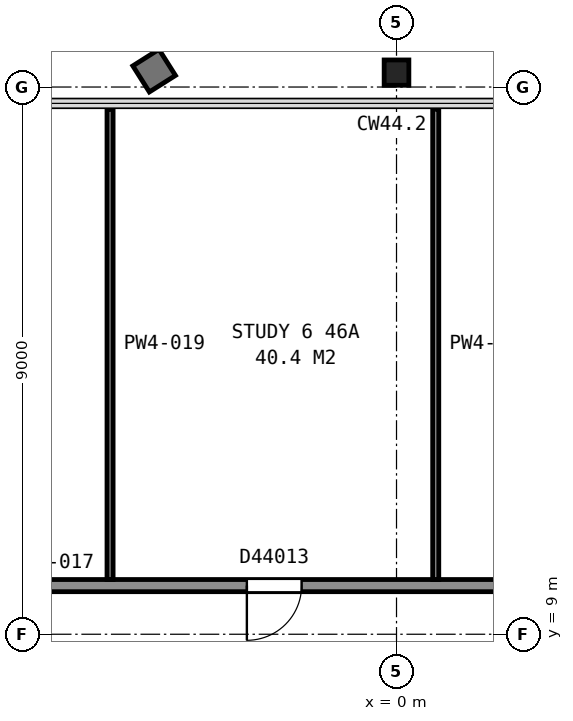
"""IFC4 building model, lengths in metres.
Left out: names, types, materials, properties, quantities, classifications, styles, units other than length and angle.
Written with IfcOpenShell. Run it as: python <this file> out.ifc"""

import sys

from ifc_helpers import new_model, si_unit, direction, frame, frame_2d, origin, origin_2d, place, context, subcontext, project, spatial, rectangle, i_section, extrude, element, fill, save


model = new_model("IFC4")
c1 = context("Model", 3, precision=1e-05, world=origin(), true_north=direction((0.0, 1.0)))
c2 = subcontext(c1, "Body", "Model", "MODEL_VIEW")
j1 = project(units=[si_unit("LENGTHUNIT", "METRE"), si_unit("PLANEANGLEUNIT", "RADIAN")], contexts=[c1])
p1 = place(None, origin())
s1 = spatial("IfcSite", under=j1, at=p1, CompositionType="ELEMENT")
p2 = place(p1, origin())
s2 = spatial("IfcBuilding", under=s1, at=p2, CompositionType="ELEMENT")
p3 = place(p2, frame((0.0, 0.0, 185.8)))
s3 = spatial("IfcBuildingStorey", under=s2, at=p3, CompositionType="ELEMENT", Elevation=185.8)
p4 = place(p3, frame((0.0, 18.016, 0.03), z_axis=(0.0, 0.185915743066, 0.982565690669), x_axis=(1.0, 0.0, 0.0)))
e1 = element("IfcColumn", 1, at=p4, inside=s3, PredefinedType="COLUMN", context=c2, shape_type="SweptSolid", body=[
    extrude(i_section(OverallWidth=0.406, OverallDepth=0.417, WebThickness=0.03, FlangeThickness=0.048, FilletRadius=0.015, at=origin_2d()), origin(), (0.0, 0.0, 1.0), 3.705),
])
p5 = place(p3, frame((-8.828, 9.8, 0.0), z_axis=(0.0, 0.0, 1.0), x_axis=(1.0, 0.0, 0.0)))
e2 = element("IfcWall", 2, at=p5, inside=s3, PredefinedType="PARTITIONING", context=c2, shape_type="SweptSolid", body=[
    extrude(rectangle(XDim=17.656, YDim=0.2, at=frame_2d((8.828, 0.0))), origin(), (0.0, 0.0, 1.0), 2.713),
])
p6 = place(p5, frame((11.723, 0.0, 0.0)))
e3 = element("IfcOpeningElement", 3, at=p6, cuts=e2, PredefinedType="OPENING", context=c2, shape_type="SweptSolid", body=[
    extrude(rectangle(XDim=0.9, YDim=2.1, at=frame_2d((0.45, 1.05))), frame((0.0, 0.11, 0.0), z_axis=(0.0, -1.0, 0.0), x_axis=(1.0, 0.0, 0.0)), (0.0, 0.0, 1.0), 0.22),
])
p7 = place(p5, frame((6.367, 0.0, 0.0)))
e4 = element("IfcOpeningElement", 4, at=p7, cuts=e2, PredefinedType="OPENING", context=c2, shape_type="SweptSolid", body=[
    extrude(rectangle(XDim=0.9, YDim=2.1, at=frame_2d((0.45, 1.05))), frame((0.0, 0.11, 0.0), z_axis=(0.0, -1.0, 0.0), x_axis=(1.0, 0.0, 0.0)), (0.0, 0.0, 1.0), 0.22),
])
for number, where, z_axis, x_axis in (
    (5, (-4.711, 9.9, 0.0), (0.0, 0.0, 1.0), (0.0, 1.0, 0.0)),
    (6, (0.645, 9.9, 0.0), (0.0, 0.0, 1.0), (0.0, 1.0, 0.0)),
):
    element("IfcWall", number, at=place(p3, frame(where, z_axis=z_axis, x_axis=x_axis)), inside=s3, PredefinedType="PARTITIONING", context=c2, shape_type="SweptSolid", body=[
        extrude(rectangle(XDim=7.735, YDim=0.1, at=frame_2d((3.868, 0.0))), origin(), (0.0, 0.0, 1.0), 2.713),
    ])
p8 = place(p7, origin())
e7 = element("IfcDoor", 7, at=p8, inside=s3, OperationType="SINGLE_SWING_LEFT", PredefinedType="DOOR", context=c2, shape_type="SweptSolid", body=[
    extrude(rectangle(XDim=0.9, YDim=2.1, at=frame_2d((0.45, 1.05))), frame((0.0, 0.025, 0.0), z_axis=(0.0, -1.0, 0.0), x_axis=(1.0, 0.0, 0.0)), (0.0, 0.0, 1.0), 0.05),
])
fill(e4, e7)
save(model, sys.argv[1])
